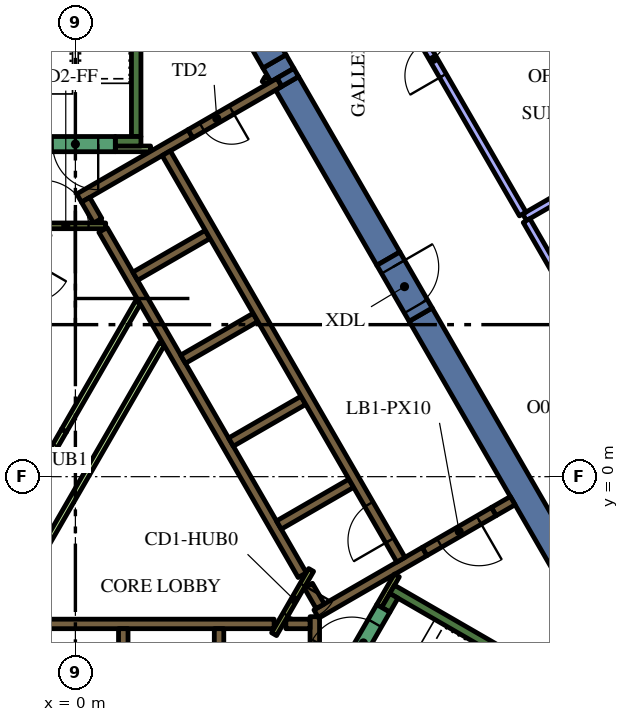
"""IFC4 building model, lengths in metres.
Left out: names, types, materials, properties, quantities, classifications, styles, units other than length and angle.
Written with IfcOpenShell. Run it as: python <this file> out.ifc"""

import sys

from ifc_helpers import new_model, si_unit, direction, frame, frame_2d, origin, place, context, subcontext, project, spatial, polyline, rectangle, outline, extrude, element, fill, save


model = new_model("IFC4")
c1 = context("Model", 3, precision=1e-05, world=origin(), true_north=direction((0.0, 1.0)))
c2 = subcontext(c1, "Body", "Model", "MODEL_VIEW")
j1 = project(units=[si_unit("LENGTHUNIT", "METRE"), si_unit("PLANEANGLEUNIT", "RADIAN")], contexts=[c1])
p1 = place(None, origin())
s1 = spatial("IfcSite", under=j1, at=p1, CompositionType="ELEMENT")
p2 = place(p1, origin())
s2 = spatial("IfcBuilding", under=s1, at=p2, CompositionType="ELEMENT")
p3 = place(p2, frame((0.0, 0.0, 222.6)))
s3 = spatial("IfcBuildingStorey", under=s2, at=p3, CompositionType="ELEMENT", Elevation=222.6)
p4 = place(p3, frame((9.085, 4.264, 0.0), z_axis=(0.0, 0.0, 1.0), x_axis=(0.499998082512, -0.866026510844, 0.0)))
e1 = element("IfcWall", 1, at=p4, inside=s3, PredefinedType="SOLIDWALL", context=c2, shape_type="SweptSolid", body=[
    extrude(rectangle(XDim=12.472, YDim=0.7, at=frame_2d((6.236, 0.0))), origin(), (0.0, 0.0, 1.0), 4.2),
])
p5 = place(p3, frame((5.445, 10.569, 0.0), z_axis=(0.0, 0.0, 1.0), x_axis=(-0.500218351069, 0.865899302029, 0.0)))
e2 = element("IfcWall", 2, at=p5, inside=s3, PredefinedType="SOLIDWALL", context=c2, shape_type="SweptSolid", body=[
    extrude(rectangle(XDim=0.412, YDim=0.7, at=frame_2d((0.206, 0.0))), origin(), (0.0, 0.0, 1.0), 4.2),
])
p6 = place(p3, frame((5.571, 10.35, 0.0), z_axis=(0.0, 0.0, 1.0), x_axis=(0.499968379186, -0.8660436593, 0.0)))
e3 = element("IfcWall", 3, at=p6, inside=s3, PredefinedType="SOLIDWALL", context=c2, shape_type="SweptSolid", body=[
    extrude(rectangle(XDim=5.328, YDim=0.7, at=frame_2d((2.664, 0.0))), origin(), (0.0, 0.0, 1.0), 4.2),
])
p7 = place(p3, origin())
e4 = element("IfcWall", 4, at=p7, inside=s3, PredefinedType="SOLIDWALL", context=c2, shape_type="SweptSolid", body=[
    extrude(outline(polyline([(5.432, 10.272), (5.308, 10.487), (5.749, 10.742), (5.873, 10.527), (5.432, 10.272)])), origin(), (0.0, 0.0, 1.0), 4.2),
])
p8 = place(p3, frame((5.238, 10.927, 0.0), z_axis=(0.0, 0.0, 1.0), x_axis=(-0.499985607887, 0.866033712915, 0.0)))
e5 = element("IfcWall", 5, at=p8, inside=s3, PredefinedType="SOLIDWALL", context=c2, shape_type="SweptSolid", body=[
    extrude(rectangle(XDim=6.478, YDim=0.7, at=frame_2d((3.239, 0.0))), origin(), (0.0, 0.0, 1.0), 4.2),
])
p9 = place(p3, frame((8.334, -2.964, 0.0), z_axis=(0.0, 0.0, 1.0), x_axis=(0.866016039709, -0.500016218704, 0.0)))
e6 = element("IfcWall", 6, at=p9, inside=s3, PredefinedType="SOLIDWALL", context=c2, shape_type="SweptSolid", body=[
    extrude(rectangle(XDim=7.05, YDim=0.25, at=frame_2d((3.525, 0.0))), origin(), (0.0, 0.0, 1.0), 4.2),
])
p10 = place(p3, frame((8.168, -3.503, 0.0), z_axis=(0.0, 0.0, 1.0), x_axis=(0.49972245349, 0.866185586049, 0.0)))
e7 = element("IfcWall", 7, at=p10, inside=s3, PredefinedType="SOLIDWALL", context=c2, shape_type="SweptSolid", body=[
    extrude(rectangle(XDim=0.425, YDim=0.25, at=frame_2d((0.212, 0.0))), origin(), (0.0, 0.0, 1.0), 4.2),
])
p11 = place(p3, frame((1.6, 8.95, 0.0), z_axis=(0.0, 0.0, 1.0), x_axis=(0.0, 1.0, 0.0)))
e8 = element("IfcWall", 8, at=p11, inside=s3, PredefinedType="SOLIDWALL", context=c2, shape_type="SweptSolid", body=[
    extrude(rectangle(XDim=6.8, YDim=0.25, at=frame_2d((3.4, 0.0))), origin(), (0.0, 0.0, 1.0), 4.2),
])
p12 = place(p3, frame((1.05, 8.825, 0.0), z_axis=(0.0, 0.0, 1.0), x_axis=(1.0, 0.0, 0.0)))
e9 = element("IfcWall", 9, at=p12, inside=s3, PredefinedType="SOLIDWALL", context=c2, shape_type="SweptSolid", body=[
    extrude(rectangle(XDim=0.675, YDim=0.25, at=frame_2d((0.337, 0.0))), origin(), (0.0, 0.0, 1.0), 4.2),
])
p13 = place(p3, frame((-5.259, -3.875, 0.0), z_axis=(0.0, 0.0, 1.0), x_axis=(1.0, 0.0, 0.0)))
e10 = element("IfcWall", 10, at=p13, inside=s3, PredefinedType="SOLIDWALL", context=c2, shape_type="SweptSolid", body=[
    extrude(rectangle(XDim=10.489, YDim=0.25, at=frame_2d((5.244, 0.0))), origin(), (0.0, 0.0, 1.0), 4.2),
])
for number, where, z_axis, x_axis in (
    (11, (3.78, -4.0, 0.0), (0.0, 0.0, 1.0), (0.0, -1.0, 0.0)),
    (12, (1.26, -4.0, 0.0), (0.0, 0.0, 1.0), (0.0, -1.0, 0.0)),
):
    element("IfcWall", number, at=place(p3, frame(where, z_axis=z_axis, x_axis=x_axis)), inside=s3, PredefinedType="SOLIDWALL", context=c2, shape_type="SweptSolid", body=[
        extrude(rectangle(XDim=2.2, YDim=0.25, at=frame_2d((1.1, 0.0))), origin(), (0.0, 0.0, 1.0), 4.2),
    ])
p14 = place(p3, frame((6.3, -7.24, 0.0), z_axis=(0.0, 0.0, 1.0), x_axis=(0.0, 1.0, 0.0)))
e13 = element("IfcWall", 13, at=p14, inside=s3, PredefinedType="SOLIDWALL", context=c2, shape_type="SweptSolid", body=[
    extrude(rectangle(XDim=3.556, YDim=0.25, at=frame_2d((1.778, 0.0))), origin(), (0.0, 0.0, 1.0), 4.2),
])
p15 = place(p3, frame((5.538, -3.875, 0.0), z_axis=(0.0, 0.0, 1.0), x_axis=(1.0, 0.0, 0.0)))
e14 = element("IfcWall", 14, at=p15, inside=s3, PredefinedType="SOLIDWALL", context=c2, shape_type="SweptSolid", body=[
    extrude(rectangle(XDim=0.637, YDim=0.25, at=frame_2d((0.318, 0.0))), origin(), (0.0, 0.0, 1.0), 4.2),
])
p16 = place(p3, frame((9.19, -1.969, 0.0), z_axis=(0.0, 0.0, 1.0), x_axis=(-0.866057109641, -0.499945079824, 0.0)))
e15 = element("IfcWall", 15, at=p16, inside=s3, PredefinedType="SOLIDWALL", context=c2, shape_type="SweptSolid", body=[
    extrude(rectangle(XDim=3.291, YDim=0.25, at=frame_2d((1.646, 0.0))), origin(), (0.0, 0.0, 1.0), 4.2),
])
p17 = place(p3, frame((6.13, -2.867, 0.0), z_axis=(0.0, 0.0, 1.0), x_axis=(0.500160776593, -0.865932559475, 0.0)))
e16 = element("IfcWall", 16, at=p17, inside=s3, PredefinedType="SOLIDWALL", context=c2, shape_type="SweptSolid", body=[
    extrude(rectangle(XDim=0.627, YDim=0.25, at=frame_2d((0.313, 0.0))), origin(), (0.0, 0.0, 1.0), 4.2),
])
p18 = place(p3, frame((11.507, -0.631, 0.0), z_axis=(0.0, 0.0, 1.0), x_axis=(-0.866093731455, -0.499881634324, 0.0)))
e17 = element("IfcWall", 17, at=p18, inside=s3, PredefinedType="SOLIDWALL", context=c2, shape_type="SweptSolid", body=[
    extrude(rectangle(XDim=0.575, YDim=0.25, at=frame_2d((0.288, 0.0))), origin(), (0.0, 0.0, 1.0), 4.2),
])
p19 = place(p3, frame((3.028, 9.023, 0.0), z_axis=(0.0, 0.0, 1.0), x_axis=(-0.866036587186, -0.49998062928, 0.0)))
e18 = element("IfcWall", 18, at=p19, inside=s3, PredefinedType="SOLIDWALL", context=c2, shape_type="SweptSolid", body=[
    extrude(rectangle(XDim=3.384, YDim=0.25, at=frame_2d((1.692, 0.0))), origin(), (0.0, 0.0, 1.0), 4.2),
])
p20 = place(p3, frame((0.268, 7.285, 0.0), z_axis=(0.0, 0.0, 1.0), x_axis=(0.500098681536, -0.865968422476, 0.0)))
e19 = element("IfcWall", 19, at=p20, inside=s3, PredefinedType="SOLIDWALL", context=c2, shape_type="SweptSolid", body=[
    extrude(rectangle(XDim=0.636, YDim=0.25, at=frame_2d((0.318, 0.0))), origin(), (0.0, 0.0, 1.0), 4.2),
])
p21 = place(p3, frame((5.97, -2.591, 0.0), z_axis=(0.0, 0.0, 1.0), x_axis=(-0.499994469932, 0.866028596547, 0.0)))
e20 = element("IfcWall", 20, at=p21, inside=s3, PredefinedType="SOLIDWALL", context=c2, shape_type="SweptSolid", body=[
    extrude(rectangle(XDim=10.488, YDim=0.25, at=frame_2d((5.244, 0.0))), origin(), (0.0, 0.0, 1.0), 4.2),
])
p22 = place(p3, frame((1.574, 5.274, 0.0), z_axis=(0.0, 0.0, 1.0), x_axis=(0.866028486751, 0.499994660107, 0.0)))
e21 = element("IfcWall", 21, at=p22, inside=s3, PredefinedType="SOLIDWALL", context=c2, shape_type="SweptSolid", body=[
    extrude(rectangle(XDim=2.2, YDim=0.25, at=frame_2d((1.1, 0.0))), origin(), (0.0, 0.0, 1.0), 4.2),
])
for number, where, z_axis, x_axis in (
    (22, (2.834, 3.091, 0.0), (0.0, 0.0, 1.0), (0.866, 0.5, 0.0)),
    (23, (4.094, 0.909, 0.0), (0.0, 0.0, 1.0), (0.866, 0.5, 0.0)),
    (24, (5.354, -1.274, 0.0), (0.0, 0.0, 1.0), (0.866, 0.5, 0.0)),
):
    element("IfcWall", number, at=place(p3, frame(where, z_axis=z_axis, x_axis=x_axis)), inside=s3, PredefinedType="SOLIDWALL", context=c2, shape_type="SweptSolid", body=[
        extrude(rectangle(XDim=2.2, YDim=0.25, at=frame_2d((1.1, 0.0))), origin(), (0.0, 0.0, 1.0), 4.2),
    ])
p23 = place(p3, frame((1.05, 8.625, 0.0), z_axis=(0.0, 0.0, 1.0), x_axis=(1.0, 0.0, 0.0)))
e25 = element("IfcWall", 25, at=p23, inside=s3, PredefinedType="PARTITIONING", context=c2, shape_type="SweptSolid", body=[
    extrude(rectangle(XDim=0.929, YDim=0.15, at=frame_2d((0.464, 0.0))), origin(), (0.0, 0.0, 1.0), 3.45),
])
p24 = place(p3, frame((4.98, 10.358, 0.0), z_axis=(0.0, 0.0, 1.0), x_axis=(0.500640202437, 0.86565546709, 0.0)))
e26 = element("IfcWall", 26, at=p24, inside=s3, PredefinedType="PARTITIONING", context=c2, shape_type="SweptSolid", body=[
    extrude(rectangle(XDim=0.146, YDim=0.15, at=frame_2d((0.073, 0.0))), origin(), (0.0, 0.0, 1.0), 3.45),
])
p25 = place(p3, frame((8.459, -2.599, 0.0), z_axis=(0.0, 0.0, 1.0), x_axis=(-0.500041054325, -0.866001699761, 0.0)))
e27 = element("IfcWall", 27, at=p25, inside=s3, PredefinedType="PARTITIONING", context=c2, shape_type="SweptSolid", body=[
    extrude(rectangle(XDim=0.929, YDim=0.15, at=frame_2d((0.464, 0.0))), origin(), (0.0, 0.0, 1.0), 4.2),
])
p26 = place(p3, frame((-1.887, -3.718, 0.0), z_axis=(0.0, 0.0, 1.0), x_axis=(0.500005008002, 0.866022512394, 0.0)))
e28 = element("IfcWall", 28, at=p26, inside=s3, PredefinedType="PARTITIONING", context=c2, shape_type="SweptSolid", body=[
    extrude(rectangle(XDim=8.327, YDim=0.15, at=frame_2d((4.164, 0.0))), origin(), (0.0, 0.0, 1.0), 3.45),
])
p27 = place(p3, frame((-0.3, 1.212, 0.0), z_axis=(0.0, 0.0, 1.0), x_axis=(0.499963101113, 0.866046706318, 0.0)))
e29 = element("IfcWall", 29, at=p27, inside=s3, PredefinedType="PARTITIONING", context=c2, shape_type="SweptSolid", body=[
    extrude(rectangle(XDim=3.893, YDim=0.15, at=frame_2d((1.947, 0.0))), origin(), (0.0, 0.0, 1.0), 3.45),
])
p28 = place(p3, frame((8.565, -2.185, 0.0), z_axis=(0.0, 0.0, 1.0), x_axis=(-0.499997954832, 0.866026584559, 0.0)))
e30 = element("IfcWall", 30, at=p28, inside=s3, PredefinedType="SOLIDWALL", context=c2, shape_type="SweptSolid", body=[
    extrude(rectangle(XDim=12.35, YDim=0.25, at=frame_2d((6.175, 0.0))), origin(), (0.0, 0.0, 1.0), 4.2),
])
p29 = place(p28, frame((0.585, 0.0, 0.0)))
e31 = element("IfcOpeningElement", 31, at=p29, cuts=e30, PredefinedType="OPENING", context=c2, shape_type="SweptSolid", body=[
    extrude(rectangle(XDim=1.1, YDim=2.1, at=frame_2d((0.55, 1.05))), frame((0.0, 0.135, 0.0), z_axis=(0.0, -1.0, 0.0), x_axis=(1.0, 0.0, 0.0)), (0.0, 0.0, 1.0), 0.27),
])
p30 = place(p3, frame((7.053, -5.284, 0.0), z_axis=(0.0, 0.0, 1.0), x_axis=(0.500078061341, 0.865980330357, 0.0)))
e32 = element("IfcWall", 32, at=p30, inside=s3, PredefinedType="SOLIDWALL", context=c2, shape_type="SweptSolid", body=[
    extrude(rectangle(XDim=2.1, YDim=0.4, at=frame_2d((1.05, 0.0))), origin(), (0.0, 0.0, 1.0), 4.2),
])
p31 = place(p30, frame((0.45, 0.0, 0.0)))
e33 = element("IfcOpeningElement", 33, at=p31, cuts=e32, PredefinedType="OPENING", context=c2, shape_type="SweptSolid", body=[
    extrude(rectangle(XDim=1.2, YDim=2.1, at=frame_2d((0.6, 1.05))), frame((0.0, 0.21, 0.0), z_axis=(0.0, -1.0, 0.0), x_axis=(1.0, 0.0, 0.0)), (0.0, 0.0, 1.0), 0.42),
])
p32 = place(p3, frame((1.05, 8.75, 0.0), z_axis=(0.0, 0.0, 1.0), x_axis=(-1.0, 0.0, 0.0)))
e34 = element("IfcWall", 34, at=p32, inside=s3, PredefinedType="SOLIDWALL", context=c2, shape_type="SweptSolid", body=[
    extrude(rectangle(XDim=2.1, YDim=0.4, at=frame_2d((1.05, 0.0))), origin(), (0.0, 0.0, 1.0), 4.2),
])
p33 = place(p32, frame((0.45, 0.0, 0.0)))
e35 = element("IfcOpeningElement", 35, at=p33, cuts=e34, PredefinedType="OPENING", context=c2, shape_type="SweptSolid", body=[
    extrude(rectangle(XDim=1.2, YDim=2.1, at=frame_2d((0.6, 1.05))), frame((0.0, 0.21, 0.0), z_axis=(0.0, -1.0, 0.0), x_axis=(1.0, 0.0, 0.0)), (0.0, 0.0, 1.0), 0.42),
])
p34 = place(p3, frame((5.366, 10.373, 0.0), z_axis=(0.0, 0.0, 1.0), x_axis=(-0.866019956843, -0.50000943426, 0.0)))
e36 = element("IfcWall", 36, at=p34, inside=s3, PredefinedType="SOLIDWALL", context=c2, shape_type="SweptSolid", body=[
    extrude(rectangle(XDim=2.7, YDim=0.25, at=frame_2d((1.35, 0.0))), origin(), (0.0, 0.0, 1.0), 4.2),
])
p35 = place(p34, frame((1.45, 0.0, 0.0)))
e37 = element("IfcOpeningElement", 37, at=p35, cuts=e36, PredefinedType="OPENING", context=c2, shape_type="SweptSolid", body=[
    extrude(rectangle(XDim=0.9, YDim=2.1, at=frame_2d((0.45, 1.05))), frame((0.0, 0.135, 0.0), z_axis=(0.0, -1.0, 0.0), x_axis=(1.0, 0.0, 0.0)), (0.0, 0.0, 1.0), 0.27),
])
p36 = place(p3, frame((6.203, -2.456, 0.0), z_axis=(0.0, 0.0, 1.0), x_axis=(-0.500043961785, -0.866000020948, 0.0)))
e38 = element("IfcWall", 38, at=p36, inside=s3, PredefinedType="PARTITIONING", context=c2, shape_type="SweptSolid", body=[
    extrude(rectangle(XDim=1.95, YDim=0.15, at=frame_2d((0.975, 0.0))), origin(), (0.0, 0.0, 1.0), 4.2),
])
p37 = place(p36, frame((0.45, 0.0, 0.0)))
e39 = element("IfcOpeningElement", 39, at=p37, cuts=e38, PredefinedType="OPENING", context=c2, shape_type="SweptSolid", body=[
    extrude(rectangle(XDim=0.9, YDim=2.1, at=frame_2d((0.45, 1.05))), frame((0.0, 0.085, 0.0), z_axis=(0.0, -1.0, 0.0), x_axis=(1.0, 0.0, 0.0)), (0.0, 0.0, 1.0), 0.17),
])
p38 = place(p3, frame((-1.303, 6.6, 0.0), z_axis=(0.0, 0.0, 1.0), x_axis=(1.0, 0.0, 0.0)))
e40 = element("IfcWall", 40, at=p38, inside=s3, PredefinedType="PARTITIONING", context=c2, shape_type="SweptSolid", body=[
    extrude(rectangle(XDim=2.1, YDim=0.15, at=frame_2d((1.05, 0.0))), origin(), (0.0, 0.0, 1.0), 4.2),
])
p39 = place(p38, frame((0.45, 0.0, 0.0)))
e41 = element("IfcOpeningElement", 41, at=p39, cuts=e40, PredefinedType="OPENING", context=c2, shape_type="SweptSolid", body=[
    extrude(rectangle(XDim=1.2, YDim=2.1, at=frame_2d((0.6, 1.05))), frame((0.0, 0.085, 0.0), z_axis=(0.0, -1.0, 0.0), x_axis=(1.0, 0.0, 0.0)), (0.0, 0.0, 1.0), 0.17),
])
p40 = place(p3, frame((11.009, -0.919, 0.0), z_axis=(0.0, 0.0, 1.0), x_axis=(-0.866059744384, -0.49994051562, 0.0)))
e42 = element("IfcWall", 42, at=p40, inside=s3, PredefinedType="SOLIDWALL", context=c2, shape_type="SweptSolid", body=[
    extrude(rectangle(XDim=2.1, YDim=0.25, at=frame_2d((1.05, 0.0))), origin(), (0.0, 0.0, 1.0), 4.2),
])
p41 = place(p40, frame((0.45, 0.0, 0.0)))
e43 = element("IfcOpeningElement", 43, at=p41, cuts=e42, PredefinedType="OPENING", context=c2, shape_type="SweptSolid", body=[
    extrude(rectangle(XDim=1.2, YDim=2.1, at=frame_2d((0.6, 1.05))), frame((0.0, 0.135, 0.0), z_axis=(0.0, -1.0, 0.0), x_axis=(1.0, 0.0, 0.0)), (0.0, 0.0, 1.0), 0.27),
])
p42 = place(p3, frame((8.235, 5.736, 0.0), z_axis=(0.0, 0.0, 1.0), x_axis=(0.499954529098, -0.86605165483, 0.0)))
e44 = element("IfcWall", 44, at=p42, inside=s3, PredefinedType="SOLIDWALL", context=c2, shape_type="SweptSolid", body=[
    extrude(rectangle(XDim=1.7, YDim=0.7, at=frame_2d((0.85, 0.0))), origin(), (0.0, 0.0, 1.0), 4.2),
])
p43 = place(p42, frame((0.25, 0.0, 0.0)))
e45 = element("IfcOpeningElement", 45, at=p43, cuts=e44, PredefinedType="OPENING", context=c2, shape_type="SweptSolid", body=[
    extrude(rectangle(XDim=1.2, YDim=2.1, at=frame_2d((0.6, 1.05))), frame((0.0, 0.36, 0.0), z_axis=(0.0, -1.0, 0.0), x_axis=(1.0, 0.0, 0.0)), (0.0, 0.0, 1.0), 0.72),
])
p44 = place(p3, frame((-1.2, -0.346, 0.0), z_axis=(0.0, 0.0, 1.0), x_axis=(0.499961193289, 0.866047807691, 0.0)))
e46 = element("IfcWall", 46, at=p44, inside=s3, PredefinedType="PARTITIONING", context=c2, shape_type="SweptSolid", body=[
    extrude(rectangle(XDim=1.8, YDim=0.15, at=frame_2d((0.9, 0.0))), origin(), (0.0, 0.0, 1.0), 3.45),
])
p45 = place(p44, frame((0.45, 0.0, 0.0)))
e47 = element("IfcOpeningElement", 47, at=p45, cuts=e46, PredefinedType="OPENING", context=c2, shape_type="SweptSolid", body=[
    extrude(rectangle(XDim=0.9, YDim=2.1, at=frame_2d((0.45, 1.05))), frame((0.0, 0.085, 0.0), z_axis=(0.0, -1.0, 0.0), x_axis=(1.0, 0.0, 0.0)), (0.0, 0.0, 1.0), 0.17),
])
p46 = place(p3, frame((11.821, 6.825, 0.0), z_axis=(0.0, 0.0, 1.0), x_axis=(0.866011792348, 0.500023574959, 0.0)))
e48 = element("IfcWall", 48, at=p46, inside=s3, PredefinedType="PARTITIONING", context=c2, shape_type="SweptSolid", body=[
    extrude(rectangle(XDim=5.381, YDim=0.2, at=frame_2d((2.69, 0.0))), origin(), (0.0, 0.0, 1.0), 3.45),
])
p47 = place(p3, frame((16.581, -1.419, 0.0), z_axis=(0.0, 0.0, 1.0), x_axis=(-0.500019350398, 0.866014231539, 0.0)))
e49 = element("IfcWall", 49, at=p47, inside=s3, PredefinedType="PARTITIONING", context=c2, shape_type="SweptSolid", body=[
    extrude(rectangle(XDim=9.42, YDim=0.2, at=frame_2d((4.71, 0.0))), origin(), (0.0, 0.0, 1.0), 3.45),
])
p48 = place(p47, frame((4.2, 0.0, 0.0)))
e50 = element("IfcOpeningElement", 50, at=p48, cuts=e49, PredefinedType="OPENING", context=c2, shape_type="SweptSolid", body=[
    extrude(rectangle(XDim=1.0, YDim=2.1, at=frame_2d((0.5, 1.05))), frame((0.0, 0.11, 0.0), z_axis=(0.0, -1.0, 0.0), x_axis=(1.0, 0.0, 0.0)), (0.0, 0.0, 1.0), 0.22),
])
p49 = place(p3, frame((11.771, 6.912, 0.0), z_axis=(0.0, 0.0, 1.0), x_axis=(-0.500008127286, 0.866020711443, 0.0)))
e51 = element("IfcWall", 51, at=p49, inside=s3, PredefinedType="PARTITIONING", context=c2, shape_type="SweptSolid", body=[
    extrude(rectangle(XDim=9.42, YDim=0.2, at=frame_2d((4.71, 0.0))), origin(), (0.0, 0.0, 1.0), 3.45),
])
p50 = place(p49, frame((4.2, 0.0, 0.0)))
e52 = element("IfcOpeningElement", 52, at=p50, cuts=e51, PredefinedType="OPENING", context=c2, shape_type="SweptSolid", body=[
    extrude(rectangle(XDim=1.0, YDim=2.1, at=frame_2d((0.5, 1.05))), frame((0.0, 0.11, 0.0), z_axis=(0.0, -1.0, 0.0), x_axis=(1.0, 0.0, 0.0)), (0.0, 0.0, 1.0), 0.22),
])
p51 = place(p29, origin())
e53 = element("IfcDoor", 53, at=p51, inside=s3, OperationType="DOUBLE_DOOR_SLIDING", PredefinedType="DOOR", context=c2, shape_type="SweptSolid", body=[
    extrude(rectangle(XDim=1.1, YDim=2.1, at=frame_2d((0.55, 1.05))), frame((0.0, 0.025, 0.0), z_axis=(0.0, -1.0, 0.0), x_axis=(1.0, 0.0, 0.0)), (0.0, 0.0, 1.0), 0.05),
])
fill(e31, e53)
p52 = place(p31, origin())
e54 = element("IfcDoor", 54, at=p52, inside=s3, OperationType="SINGLE_SWING_LEFT", PredefinedType="DOOR", context=c2, shape_type="SweptSolid", body=[
    extrude(rectangle(XDim=1.2, YDim=2.1, at=frame_2d((0.6, 1.05))), frame((0.0, 0.025, 0.0), z_axis=(0.0, -1.0, 0.0), x_axis=(1.0, 0.0, 0.0)), (0.0, 0.0, 1.0), 0.05),
])
fill(e33, e54)
p53 = place(p33, origin())
e55 = element("IfcDoor", 55, at=p53, inside=s3, OperationType="SINGLE_SWING_LEFT", PredefinedType="DOOR", context=c2, shape_type="SweptSolid", body=[
    extrude(rectangle(XDim=1.2, YDim=2.1, at=frame_2d((0.6, 1.05))), frame((0.0, 0.025, 0.0), z_axis=(0.0, -1.0, 0.0), x_axis=(1.0, 0.0, 0.0)), (0.0, 0.0, 1.0), 0.05),
])
fill(e35, e55)
p54 = place(p35, origin())
e56 = element("IfcDoor", 56, at=p54, inside=s3, OperationType="SINGLE_SWING_LEFT", PredefinedType="DOOR", context=c2, shape_type="SweptSolid", body=[
    extrude(rectangle(XDim=0.9, YDim=2.1, at=frame_2d((0.45, 1.05))), frame((0.0, 0.025, 0.0), z_axis=(0.0, -1.0, 0.0), x_axis=(1.0, 0.0, 0.0)), (0.0, 0.0, 1.0), 0.05),
])
fill(e37, e56)
p55 = place(p37, origin())
e57 = element("IfcDoor", 57, at=p55, inside=s3, OperationType="SINGLE_SWING_LEFT", PredefinedType="DOOR", context=c2, shape_type="SweptSolid", body=[
    extrude(rectangle(XDim=0.9, YDim=2.1, at=frame_2d((0.45, 1.05))), frame((0.0, 0.025, 0.0), z_axis=(0.0, -1.0, 0.0), x_axis=(1.0, 0.0, 0.0)), (0.0, 0.0, 1.0), 0.05),
])
fill(e39, e57)
p56 = place(p39, origin())
e58 = element("IfcDoor", 58, at=p56, inside=s3, OperationType="SINGLE_SWING_LEFT", PredefinedType="DOOR", context=c2, shape_type="SweptSolid", body=[
    extrude(rectangle(XDim=1.2, YDim=2.1, at=frame_2d((0.6, 1.05))), frame((0.0, 0.025, 0.0), z_axis=(0.0, -1.0, 0.0), x_axis=(1.0, 0.0, 0.0)), (0.0, 0.0, 1.0), 0.05),
])
fill(e41, e58)
p57 = place(p41, origin())
e59 = element("IfcDoor", 59, at=p57, inside=s3, OperationType="SINGLE_SWING_LEFT", PredefinedType="DOOR", context=c2, shape_type="SweptSolid", body=[
    extrude(rectangle(XDim=1.2, YDim=2.1, at=frame_2d((0.6, 1.05))), frame((0.0, 0.025, 0.0), z_axis=(0.0, -1.0, 0.0), x_axis=(1.0, 0.0, 0.0)), (0.0, 0.0, 1.0), 0.05),
])
fill(e43, e59)
p58 = place(p43, origin())
e60 = element("IfcDoor", 60, at=p58, inside=s3, OperationType="SINGLE_SWING_LEFT", PredefinedType="DOOR", context=c2, shape_type="SweptSolid", body=[
    extrude(rectangle(XDim=1.2, YDim=2.1, at=frame_2d((0.6, 1.05))), frame((0.0, 0.025, 0.0), z_axis=(0.0, -1.0, 0.0), x_axis=(1.0, 0.0, 0.0)), (0.0, 0.0, 1.0), 0.05),
])
fill(e45, e60)
p59 = place(p45, origin())
e61 = element("IfcDoor", 61, at=p59, inside=s3, OperationType="SINGLE_SWING_LEFT", PredefinedType="DOOR", context=c2, shape_type="SweptSolid", body=[
    extrude(rectangle(XDim=0.9, YDim=2.1, at=frame_2d((0.45, 1.05))), frame((0.0, 0.025, 0.0), z_axis=(0.0, -1.0, 0.0), x_axis=(1.0, 0.0, 0.0)), (0.0, 0.0, 1.0), 0.05),
])
fill(e47, e61)
p60 = place(p50, origin())
e62 = element("IfcDoor", 62, at=p60, inside=s3, OperationType="SINGLE_SWING_LEFT", PredefinedType="DOOR", context=c2, shape_type="SweptSolid", body=[
    extrude(rectangle(XDim=1.0, YDim=2.1, at=frame_2d((0.5, 1.05))), frame((0.0, 0.025, 0.0), z_axis=(0.0, -1.0, 0.0), x_axis=(1.0, 0.0, 0.0)), (0.0, 0.0, 1.0), 0.05),
])
fill(e52, e62)
save(model, sys.argv[1])
